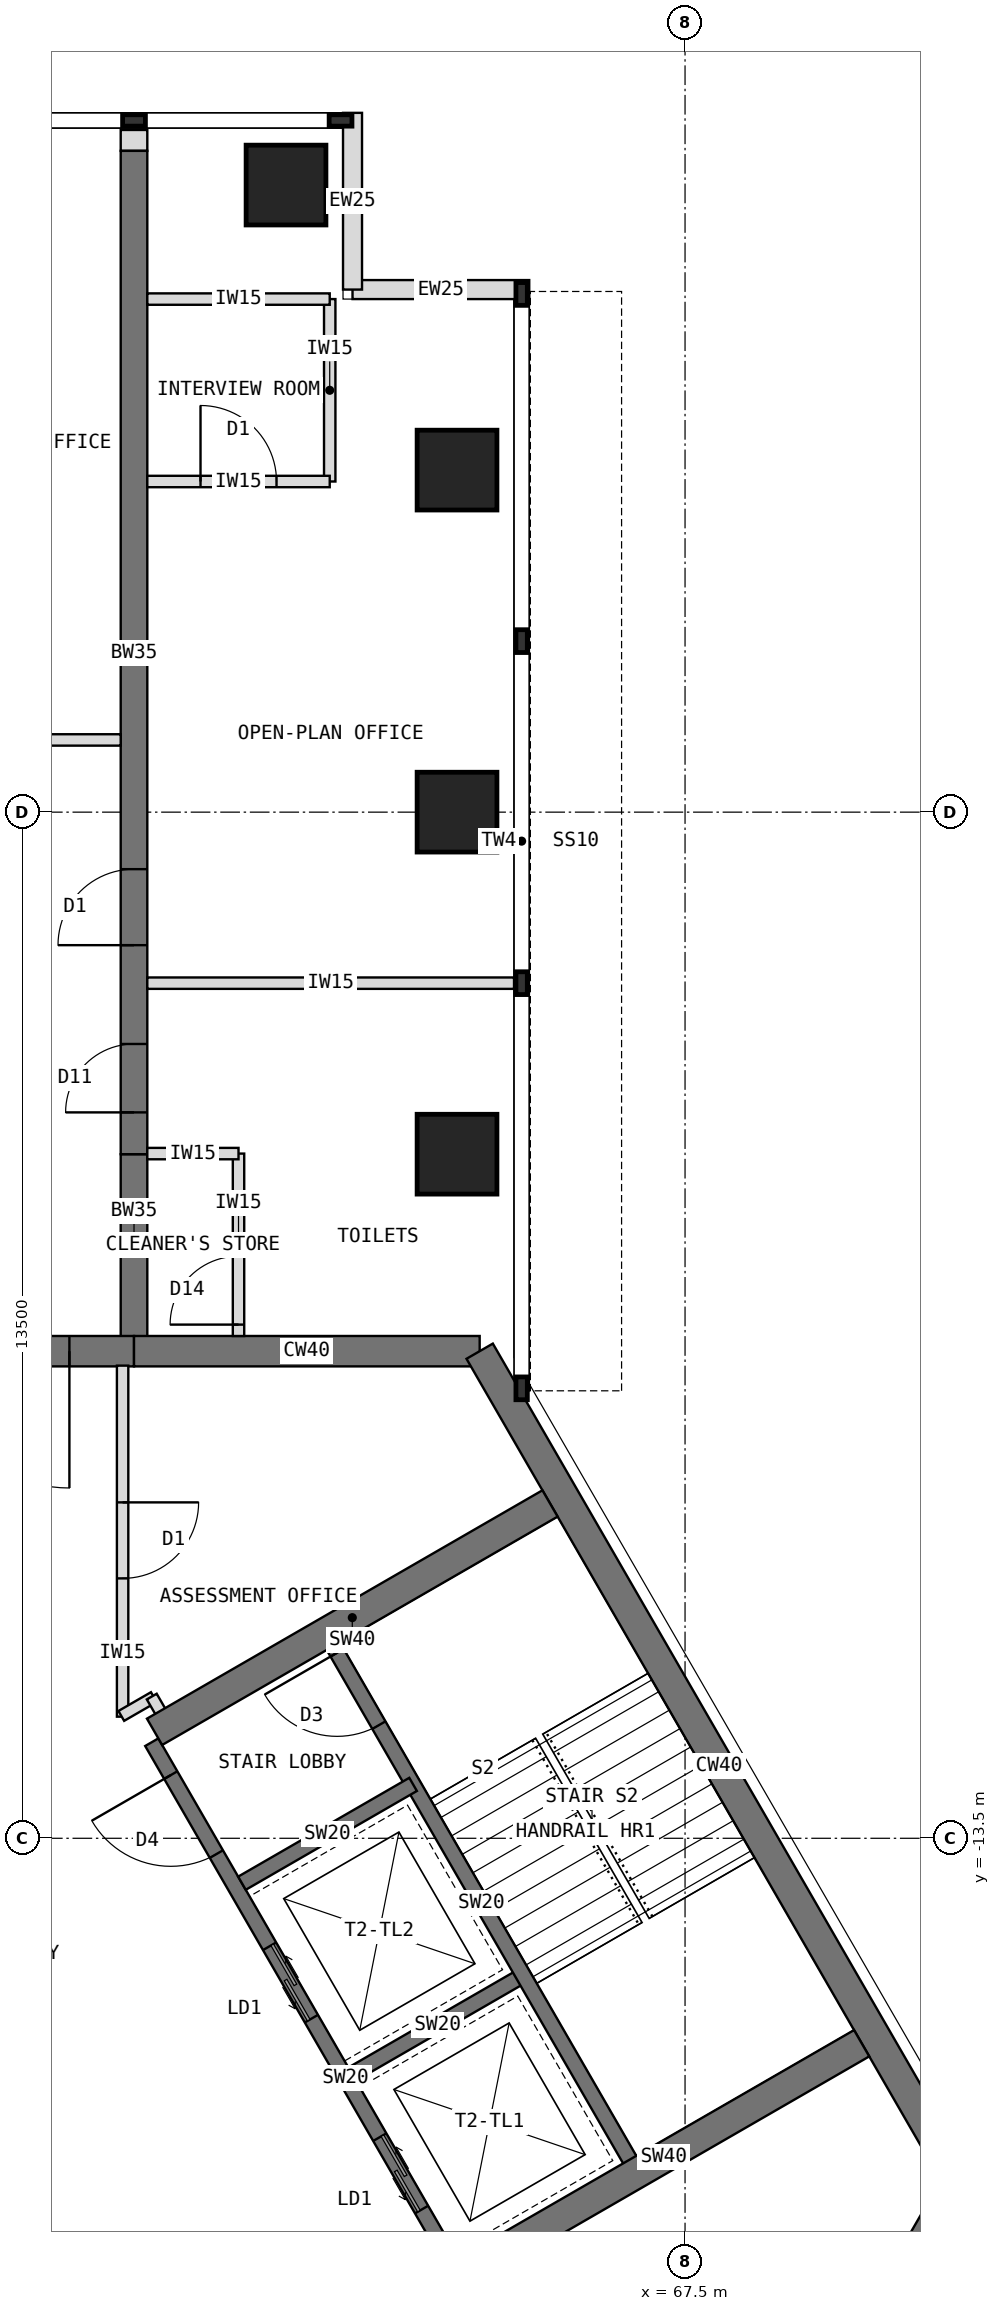
"""IFC4 building model, lengths in metres.
Left out: names, types, materials, properties, quantities, classifications, styles, units other than length and angle.
Written with IfcOpenShell. Run it as: python <this file> out.ifc"""

import sys

from ifc_helpers import new_model, si_unit, direction, frame, frame_2d, origin, origin_2d, place, context, subcontext, project, spatial, rectangle, extrude, element, fill, save


model = new_model("IFC4")
c1 = context("Model", 3, precision=1e-05, world=origin(), true_north=direction((0.0, 1.0)))
c2 = subcontext(c1, "Body", "Model", "MODEL_VIEW")
j1 = project(units=[si_unit("LENGTHUNIT", "METRE"), si_unit("PLANEANGLEUNIT", "RADIAN")], contexts=[c1])
p1 = place(None, origin())
s1 = spatial("IfcSite", under=j1, at=p1, CompositionType="ELEMENT")
p2 = place(p1, origin())
s2 = spatial("IfcBuilding", under=s1, at=p2, CompositionType="ELEMENT")
p3 = place(p2, frame((0.0, 0.0, 255.5)))
s3 = spatial("IfcBuildingStorey", under=s2, at=p3, CompositionType="ELEMENT", Elevation=255.5)
p4 = place(p3, frame((64.798, -7.092, 0.0), z_axis=(0.0, 0.0, 1.0), x_axis=(-1.0, 0.0, 0.0)))
e1 = element("IfcWall", 1, at=p4, inside=s3, PredefinedType="SHEAR", context=c2, shape_type="SweptSolid", body=[
    extrude(rectangle(XDim=4.548, YDim=0.4, at=frame_2d((2.274, 0.0))), origin(), (0.0, 0.0, 1.0), 4.0),
])
p5 = place(p3, frame((60.25, -7.092, 0.0), z_axis=(0.0, 0.0, 1.0), x_axis=(-1.0, 0.0, 0.0)))
e2 = element("IfcWall", 2, at=p5, inside=s3, PredefinedType="SHEAR", context=c2, shape_type="SweptSolid", body=[
    extrude(rectangle(XDim=3.5, YDim=0.4, at=frame_2d((1.75, 0.0))), origin(), (0.0, 0.0, 1.0), 4.0),
])
p6 = place(p5, frame((0.85, 0.0, 0.0)))
e3 = element("IfcOpeningElement", 3, at=p6, cuts=e2, PredefinedType="OPENING", context=c2, shape_type="SweptSolid", body=[
    extrude(rectangle(XDim=1.8, YDim=2.1, at=frame_2d((0.9, 1.05))), frame((0.0, 0.21, 0.0), z_axis=(0.0, -1.0, 0.0), x_axis=(1.0, 0.0, 0.0)), (0.0, 0.0, 1.0), 0.42),
])
p7 = place(p3, frame((68.822, -21.939, 0.0), z_axis=(0.0, 0.0, 1.0), x_axis=(0.500024481964, 0.866011268655, 0.0)))
e4 = element("IfcWall", 4, at=p7, inside=s3, PredefinedType="SHEAR", context=c2, shape_type="SweptSolid", body=[
    extrude(rectangle(XDim=4.548, YDim=0.4, at=frame_2d((2.274, 0.0))), origin(), (0.0, 0.0, 1.0), 4.0),
])
p8 = place(p3, frame((71.096, -18.0, 0.0), z_axis=(0.0, 0.0, 1.0), x_axis=(-0.500005998175, 0.866021940709, 0.0)))
e5 = element("IfcWall", 5, at=p8, inside=s3, PredefinedType="SHEAR", context=c2, shape_type="SweptSolid", body=[
    extrude(rectangle(XDim=12.596, YDim=0.4, at=frame_2d((6.298, 0.0))), origin(), (0.0, 0.0, 1.0), 4.0),
])
p9 = place(p3, frame((60.25, -7.092, 0.0), z_axis=(0.0, 0.0, 1.0), x_axis=(0.0, 1.0, 0.0)))
e6 = element("IfcWall", 6, at=p9, inside=s3, PredefinedType="SHEAR", context=c2, shape_type="SweptSolid", body=[
    extrude(rectangle(XDim=2.592, YDim=0.35, at=frame_2d((1.296, 0.0))), origin(), (0.0, 0.0, 1.0), 4.0),
])
p10 = place(p3, frame((60.25, -4.5, 0.0), z_axis=(0.0, 0.0, 1.0), x_axis=(0.0, 1.0, 0.0)))
e7 = element("IfcWall", 7, at=p10, inside=s3, PredefinedType="SHEAR", context=c2, shape_type="SweptSolid", body=[
    extrude(rectangle(XDim=13.2, YDim=0.35, at=frame_2d((6.6, 0.0))), origin(), (0.0, 0.0, 1.0), 4.0),
])
p11 = place(p10, frame((0.55, 0.0, 0.0)))
e8 = element("IfcOpeningElement", 8, at=p11, cuts=e7, PredefinedType="OPENING", context=c2, shape_type="SweptSolid", body=[
    extrude(rectangle(XDim=0.9, YDim=2.1, at=frame_2d((0.45, 1.05))), frame((0.0, 0.185, 0.0), z_axis=(0.0, -1.0, 0.0), x_axis=(1.0, 0.0, 0.0)), (0.0, 0.0, 1.0), 0.37),
])
p12 = place(p10, frame((2.75, 0.0, 0.0)))
e9 = element("IfcOpeningElement", 9, at=p12, cuts=e7, PredefinedType="OPENING", context=c2, shape_type="SweptSolid", body=[
    extrude(rectangle(XDim=1.0, YDim=2.1, at=frame_2d((0.5, 1.05))), frame((0.0, 0.185, 0.0), z_axis=(0.0, -1.0, 0.0), x_axis=(1.0, 0.0, 0.0)), (0.0, 0.0, 1.0), 0.37),
])
for number, where, z_axis, x_axis in (
    (10, (64.5, -4.5, 0.0), (0.0, 0.0, 1.0), (1.0, 0.0, 0.0)),
    (11, (64.5, 0.0, 0.0), (0.0, 0.0, 1.0), (1.0, 0.0, 0.0)),
    (12, (64.5, 4.5, 0.0), (0.0, 0.0, 1.0), (1.0, 0.0, 0.0)),
    (13, (62.25, 8.25, 0.0), (0.0, 0.0, 1.0), (1.0, 0.0, 0.0)),
):
    element("IfcColumn", number, at=place(p3, frame(where, z_axis=z_axis, x_axis=x_axis)), inside=s3, PredefinedType="COLUMN", context=c2, shape_type="SweptSolid", body=[
        extrude(rectangle(XDim=1.05, YDim=1.05, at=origin_2d()), origin(), (0.0, 0.0, 1.0), 4.0),
    ])
for number, where, z_axis, x_axis in (
    (14, (65.45, 6.875, 0.0), (0.0, 0.0, 1.0), (-1.0, 0.0, 0.0)),
    (15, (63.125, 6.875, 0.0), (0.0, 0.0, 1.0), (0.0, 1.0, 0.0)),
):
    element("IfcWall", number, at=place(p3, frame(where, z_axis=z_axis, x_axis=x_axis)), inside=s3, PredefinedType="STANDARD", context=c2, shape_type="SweptSolid", body=[
        extrude(rectangle(XDim=2.325, YDim=0.25, at=frame_2d((1.163, 0.0))), origin(), (0.0, 0.0, 1.0), 3.8),
    ])
p13 = place(p3, frame((60.25, 8.7, 0.0), z_axis=(0.0, 0.0, 1.0), x_axis=(0.0, 1.0, 0.0)))
e16 = element("IfcWall", 16, at=p13, inside=s3, PredefinedType="PARTITIONING", context=c2, shape_type="SweptSolid", body=[
    extrude(rectangle(XDim=0.275, YDim=0.35, at=frame_2d((0.138, 0.0))), origin(), (0.0, 0.0, 1.0), 3.8),
])
p14 = place(p3, frame((64.484, -19.164, 0.0), z_axis=(0.0, 0.0, 1.0), x_axis=(-0.49999894854, 0.866026010844, 0.0)))
e17 = element("IfcWall", 17, at=p14, inside=s3, PredefinedType="SHEAR", context=c2, shape_type="SweptSolid", body=[
    extrude(rectangle(XDim=8.0, YDim=0.2, at=frame_2d((4.0, 0.0))), origin(), (0.0, 0.0, 1.0), 4.0),
])
p15 = place(p14, frame((6.3, 0.0, 0.0)))
e18 = element("IfcOpeningElement", 18, at=p15, cuts=e17, PredefinedType="OPENING", context=c2, shape_type="SweptSolid", body=[
    extrude(rectangle(XDim=1.2, YDim=2.1, at=frame_2d((0.6, 1.05))), frame((0.0, 0.11, 0.0), z_axis=(0.0, -1.0, 0.0), x_axis=(1.0, 0.0, 0.0)), (0.0, 0.0, 1.0), 0.22),
])
p16 = place(p14, frame((0.9, 0.0, 0.0)))
e19 = element("IfcOpeningElement", 19, at=p16, cuts=e17, PredefinedType="OPENING", context=c2, shape_type="SweptSolid", body=[
    extrude(rectangle(XDim=1.1, YDim=2.2, at=frame_2d((0.55, 1.1))), frame((0.0, 0.11, 0.0), z_axis=(0.0, -1.0, 0.0), x_axis=(1.0, 0.0, 0.0)), (0.0, 0.0, 1.0), 0.22),
])
p17 = place(p14, frame((3.8, 0.0, 0.0)))
e20 = element("IfcOpeningElement", 20, at=p17, cuts=e17, PredefinedType="OPENING", context=c2, shape_type="SweptSolid", body=[
    extrude(rectangle(XDim=1.1, YDim=2.2, at=frame_2d((0.55, 1.1))), frame((0.0, 0.11, 0.0), z_axis=(0.0, -1.0, 0.0), x_axis=(1.0, 0.0, 0.0)), (0.0, 0.0, 1.0), 0.22),
])
p18 = place(p3, frame((63.12, -16.603, 0.0), z_axis=(0.0, 0.0, 1.0), x_axis=(0.866062058628, 0.499936506574, 0.0)))
e21 = element("IfcWall", 21, at=p18, inside=s3, PredefinedType="SHEAR", context=c2, shape_type="SweptSolid", body=[
    extrude(rectangle(XDim=2.6, YDim=0.2, at=frame_2d((1.3, 0.0))), origin(), (0.0, 0.0, 1.0), 4.0),
])
p19 = place(p3, frame((61.67, -14.091, 0.0), z_axis=(0.0, 0.0, 1.0), x_axis=(0.86603858612, 0.49997716683, 0.0)))
e22 = element("IfcWall", 22, at=p19, inside=s3, PredefinedType="SHEAR", context=c2, shape_type="SweptSolid", body=[
    extrude(rectangle(XDim=2.6, YDim=0.2, at=frame_2d((1.3, 0.0))), origin(), (0.0, 0.0, 1.0), 4.0),
])
p20 = place(p3, frame((66.822, -17.814, 0.0), z_axis=(0.0, 0.0, 1.0), x_axis=(-0.49999894854, 0.866026010844, 0.0)))
e23 = element("IfcWall", 23, at=p20, inside=s3, PredefinedType="SHEAR", context=c2, shape_type="SweptSolid", body=[
    extrude(rectangle(XDim=8.0, YDim=0.2, at=frame_2d((4.0, 0.0))), origin(), (0.0, 0.0, 1.0), 4.0),
])
p21 = place(p20, frame((6.7, 0.0, 0.0)))
e24 = element("IfcOpeningElement", 24, at=p21, cuts=e23, PredefinedType="OPENING", context=c2, shape_type="SweptSolid", body=[
    extrude(rectangle(XDim=1.1, YDim=2.1, at=frame_2d((0.55, 1.05))), frame((0.0, 0.11, 0.0), z_axis=(0.0, -1.0, 0.0), x_axis=(1.0, 0.0, 0.0)), (0.0, 0.0, 1.0), 0.22),
])
for number, where, z_axis, x_axis in (
    (25, (60.52, -12.099, 0.0), (0.0, 0.0, 1.0), (0.866, 0.5, 0.0)),
    (26, (64.62, -19.201, 0.0), (0.0, 0.0, 1.0), (0.866, 0.5, 0.0)),
):
    element("IfcWall", number, at=place(p3, frame(where, z_axis=z_axis, x_axis=x_axis)), inside=s3, PredefinedType="SHEAR", context=c2, shape_type="SweptSolid", body=[
        extrude(rectangle(XDim=6.008, YDim=0.4, at=frame_2d((3.004, 0.0))), origin(), (0.0, 0.0, 1.0), 4.0),
    ])
p22 = place(p3, frame((60.425, -2.25, 0.0), z_axis=(0.0, 0.0, 1.0), x_axis=(1.0, 0.0, 0.0)))
e27 = element("IfcWall", 27, at=p22, inside=s3, PredefinedType="PARTITIONING", context=c2, shape_type="SweptSolid", body=[
    extrude(rectangle(XDim=4.825, YDim=0.15, at=frame_2d((2.413, 0.0))), origin(), (0.0, 0.0, 1.0), 3.8),
])
p23 = place(p3, frame((62.825, 4.35, 0.0), z_axis=(0.0, 0.0, 1.0), x_axis=(0.0, 1.0, 0.0)))
e28 = element("IfcWall", 28, at=p23, inside=s3, PredefinedType="PARTITIONING", context=c2, shape_type="SweptSolid", body=[
    extrude(rectangle(XDim=2.4, YDim=0.15, at=frame_2d((1.2, 0.0))), origin(), (0.0, 0.0, 1.0), 3.8),
])
p24 = place(p3, frame((60.425, 4.35, 0.0), z_axis=(0.0, 0.0, 1.0), x_axis=(1.0, 0.0, 0.0)))
e29 = element("IfcWall", 29, at=p24, inside=s3, PredefinedType="PARTITIONING", context=c2, shape_type="SweptSolid", body=[
    extrude(rectangle(XDim=2.4, YDim=0.15, at=frame_2d((1.2, 0.0))), origin(), (0.0, 0.0, 1.0), 3.8),
])
p25 = place(p24, frame((0.7, 0.0, 0.0)))
e30 = element("IfcOpeningElement", 30, at=p25, cuts=e29, PredefinedType="OPENING", context=c2, shape_type="SweptSolid", body=[
    extrude(rectangle(XDim=1.0, YDim=2.1, at=frame_2d((0.5, 1.05))), frame((0.0, 0.085, 0.0), z_axis=(0.0, -1.0, 0.0), x_axis=(1.0, 0.0, 0.0)), (0.0, 0.0, 1.0), 0.17),
])
p26 = place(p3, frame((60.425, 6.75, 0.0), z_axis=(0.0, 0.0, 1.0), x_axis=(1.0, 0.0, 0.0)))
e31 = element("IfcWall", 31, at=p26, inside=s3, PredefinedType="PARTITIONING", context=c2, shape_type="SweptSolid", body=[
    extrude(rectangle(XDim=2.4, YDim=0.15, at=frame_2d((1.2, 0.0))), origin(), (0.0, 0.0, 1.0), 3.8),
])
p27 = place(p3, frame((61.625, -6.892, 0.0), z_axis=(0.0, 0.0, 1.0), x_axis=(0.0, 1.0, 0.0)))
e32 = element("IfcWall", 32, at=p27, inside=s3, PredefinedType="PARTITIONING", context=c2, shape_type="SweptSolid", body=[
    extrude(rectangle(XDim=2.4, YDim=0.15, at=frame_2d((1.2, 0.0))), origin(), (0.0, 0.0, 1.0), 3.8),
])
p28 = place(p27, frame((0.15, 0.0, 0.0)))
e33 = element("IfcOpeningElement", 33, at=p28, cuts=e32, PredefinedType="OPENING", context=c2, shape_type="SweptSolid", body=[
    extrude(rectangle(XDim=0.9, YDim=2.1, at=frame_2d((0.45, 1.05))), frame((0.0, 0.085, 0.0), z_axis=(0.0, -1.0, 0.0), x_axis=(1.0, 0.0, 0.0)), (0.0, 0.0, 1.0), 0.17),
])
p29 = place(p3, frame((60.425, -4.492, 0.0), z_axis=(0.0, 0.0, 1.0), x_axis=(1.0, 0.0, 0.0)))
e34 = element("IfcWall", 34, at=p29, inside=s3, PredefinedType="PARTITIONING", context=c2, shape_type="SweptSolid", body=[
    extrude(rectangle(XDim=1.2, YDim=0.15, at=frame_2d((0.6, 0.0))), origin(), (0.0, 0.0, 1.0), 3.267),
])
p30 = place(p3, frame((60.1, -7.282, 0.0), z_axis=(0.0, 0.0, 1.0), x_axis=(0.0, -1.0, 0.0)))
e35 = element("IfcWall", 35, at=p30, inside=s3, PredefinedType="PARTITIONING", context=c2, shape_type="SweptSolid", body=[
    extrude(rectangle(XDim=4.618, YDim=0.15, at=frame_2d((2.309, 0.0))), origin(), (0.0, 0.0, 1.0), 3.8),
])
p31 = place(p30, frame((1.799, 0.0, 0.0)))
e36 = element("IfcOpeningElement", 36, at=p31, cuts=e35, PredefinedType="OPENING", context=c2, shape_type="SweptSolid", body=[
    extrude(rectangle(XDim=1.0, YDim=2.1, at=frame_2d((0.5, 1.05))), frame((0.0, 0.085, 0.0), z_axis=(0.0, -1.0, 0.0), x_axis=(1.0, 0.0, 0.0)), (0.0, 0.0, 1.0), 0.17),
])
p32 = place(p3, frame((60.083, -11.89, 0.0), z_axis=(0.0, 0.0, 1.0), x_axis=(0.865831790172, 0.50033519877, 0.0)))
e37 = element("IfcWall", 37, at=p32, inside=s3, PredefinedType="PARTITIONING", context=c2, shape_type="SweptSolid", body=[
    extrude(rectangle(XDim=0.494, YDim=0.15, at=frame_2d((0.247, 0.0))), origin(), (0.0, 0.0, 1.0), 3.8),
])
p33 = place(p3, frame((60.483, -11.635, 0.0), z_axis=(0.0, 0.0, 1.0), x_axis=(0.500230298122, -0.865892400268, 0.0)))
e38 = element("IfcWall", 38, at=p33, inside=s3, PredefinedType="PARTITIONING", context=c2, shape_type="SweptSolid", body=[
    extrude(rectangle(XDim=0.43, YDim=0.15, at=frame_2d((0.215, 0.0))), origin(), (0.0, 0.0, 1.0), 3.8),
])
p34 = place(p3, frame((60.075, 0.95, 0.0), z_axis=(0.0, 0.0, 1.0), x_axis=(-1.0, 0.0, 0.0)))
e39 = element("IfcWall", 39, at=p34, inside=s3, PredefinedType="PARTITIONING", context=c2, shape_type="SweptSolid", body=[
    extrude(rectangle(XDim=3.15, YDim=0.15, at=frame_2d((1.575, 0.0))), origin(), (0.0, 0.0, 1.0), 3.8),
])
p35 = place(p34, frame((1.075, 0.0, 0.0)))
e40 = element("IfcOpeningElement", 40, at=p35, cuts=e39, PredefinedType="OPENING", context=c2, shape_type="SweptSolid", body=[
    extrude(rectangle(XDim=1.0, YDim=2.1, at=frame_2d((0.5, 1.05))), frame((0.0, 0.085, 0.0), z_axis=(0.0, -1.0, 0.0), x_axis=(1.0, 0.0, 0.0)), (0.0, 0.0, 1.0), 0.17),
])
p36 = place(p15, origin())
e41 = element("IfcDoor", 41, at=p36, inside=s3, OperationType="SINGLE_SWING_RIGHT", PredefinedType="DOOR", context=c2, shape_type="SweptSolid", body=[
    extrude(rectangle(XDim=1.2, YDim=2.1, at=frame_2d((0.6, 1.05))), frame((0.0, 0.025, 0.0), z_axis=(0.0, -1.0, 0.0), x_axis=(1.0, 0.0, 0.0)), (0.0, 0.0, 1.0), 0.05),
])
fill(e18, e41)
p37 = place(p16, origin())
e42 = element("IfcDoor", 42, at=p37, inside=s3, OperationType="DOUBLE_DOOR_SLIDING", PredefinedType="DOOR", context=c2, shape_type="SweptSolid", body=[
    extrude(rectangle(XDim=1.1, YDim=2.2, at=frame_2d((0.55, 1.1))), frame((0.0, 0.025, 0.0), z_axis=(0.0, -1.0, 0.0), x_axis=(1.0, 0.0, 0.0)), (0.0, 0.0, 1.0), 0.05),
])
fill(e19, e42)
p38 = place(p17, origin())
e43 = element("IfcDoor", 43, at=p38, inside=s3, OperationType="DOUBLE_DOOR_SLIDING", PredefinedType="DOOR", context=c2, shape_type="SweptSolid", body=[
    extrude(rectangle(XDim=1.1, YDim=2.2, at=frame_2d((0.55, 1.1))), frame((0.0, 0.025, 0.0), z_axis=(0.0, -1.0, 0.0), x_axis=(1.0, 0.0, 0.0)), (0.0, 0.0, 1.0), 0.05),
])
fill(e20, e43)
p39 = place(p21, origin())
e44 = element("IfcDoor", 44, at=p39, inside=s3, OperationType="SINGLE_SWING_RIGHT", PredefinedType="DOOR", context=c2, shape_type="SweptSolid", body=[
    extrude(rectangle(XDim=1.1, YDim=2.1, at=frame_2d((0.55, 1.05))), frame((0.0, 0.025, 0.0), z_axis=(0.0, -1.0, 0.0), x_axis=(1.0, 0.0, 0.0)), (0.0, 0.0, 1.0), 0.05),
])
fill(e24, e44)
p40 = place(p6, origin())
e45 = element("IfcDoor", 45, at=p40, inside=s3, OperationType="DOUBLE_DOOR_DOUBLE_SWING", PredefinedType="DOOR", context=c2, shape_type="SweptSolid", body=[
    extrude(rectangle(XDim=1.8, YDim=2.1, at=frame_2d((0.9, 1.05))), frame((0.0, 0.025, 0.0), z_axis=(0.0, -1.0, 0.0), x_axis=(1.0, 0.0, 0.0)), (0.0, 0.0, 1.0), 0.05),
])
fill(e3, e45)
p41 = place(p25, origin())
e46 = element("IfcDoor", 46, at=p41, inside=s3, OperationType="SINGLE_SWING_LEFT", PredefinedType="DOOR", context=c2, shape_type="SweptSolid", body=[
    extrude(rectangle(XDim=1.0, YDim=2.1, at=frame_2d((0.5, 1.05))), frame((0.0, 0.025, 0.0), z_axis=(0.0, -1.0, 0.0), x_axis=(1.0, 0.0, 0.0)), (0.0, 0.0, 1.0), 0.05),
])
fill(e30, e46)
p42 = place(p28, origin())
e47 = element("IfcDoor", 47, at=p42, inside=s3, OperationType="SINGLE_SWING_LEFT", PredefinedType="DOOR", context=c2, shape_type="SweptSolid", body=[
    extrude(rectangle(XDim=0.9, YDim=2.1, at=frame_2d((0.45, 1.05))), frame((0.0, 0.025, 0.0), z_axis=(0.0, -1.0, 0.0), x_axis=(1.0, 0.0, 0.0)), (0.0, 0.0, 1.0), 0.05),
])
fill(e33, e47)
p43 = place(p31, origin())
e48 = element("IfcDoor", 48, at=p43, inside=s3, OperationType="SINGLE_SWING_LEFT", PredefinedType="DOOR", context=c2, shape_type="SweptSolid", body=[
    extrude(rectangle(XDim=1.0, YDim=2.1, at=frame_2d((0.5, 1.05))), frame((0.0, 0.025, 0.0), z_axis=(0.0, -1.0, 0.0), x_axis=(1.0, 0.0, 0.0)), (0.0, 0.0, 1.0), 0.05),
])
fill(e36, e48)
p44 = place(p11, origin())
e49 = element("IfcDoor", 49, at=p44, inside=s3, OperationType="SINGLE_SWING_LEFT", PredefinedType="DOOR", context=c2, shape_type="SweptSolid", body=[
    extrude(rectangle(XDim=0.9, YDim=2.1, at=frame_2d((0.45, 1.05))), frame((0.0, 0.025, 0.0), z_axis=(0.0, -1.0, 0.0), x_axis=(1.0, 0.0, 0.0)), (0.0, 0.0, 1.0), 0.05),
])
fill(e8, e49)
p45 = place(p12, origin())
e50 = element("IfcDoor", 50, at=p45, inside=s3, OperationType="SINGLE_SWING_LEFT", PredefinedType="DOOR", context=c2, shape_type="SweptSolid", body=[
    extrude(rectangle(XDim=1.0, YDim=2.1, at=frame_2d((0.5, 1.05))), frame((0.0, 0.025, 0.0), z_axis=(0.0, -1.0, 0.0), x_axis=(1.0, 0.0, 0.0)), (0.0, 0.0, 1.0), 0.05),
])
fill(e9, e50)
save(model, sys.argv[1])
